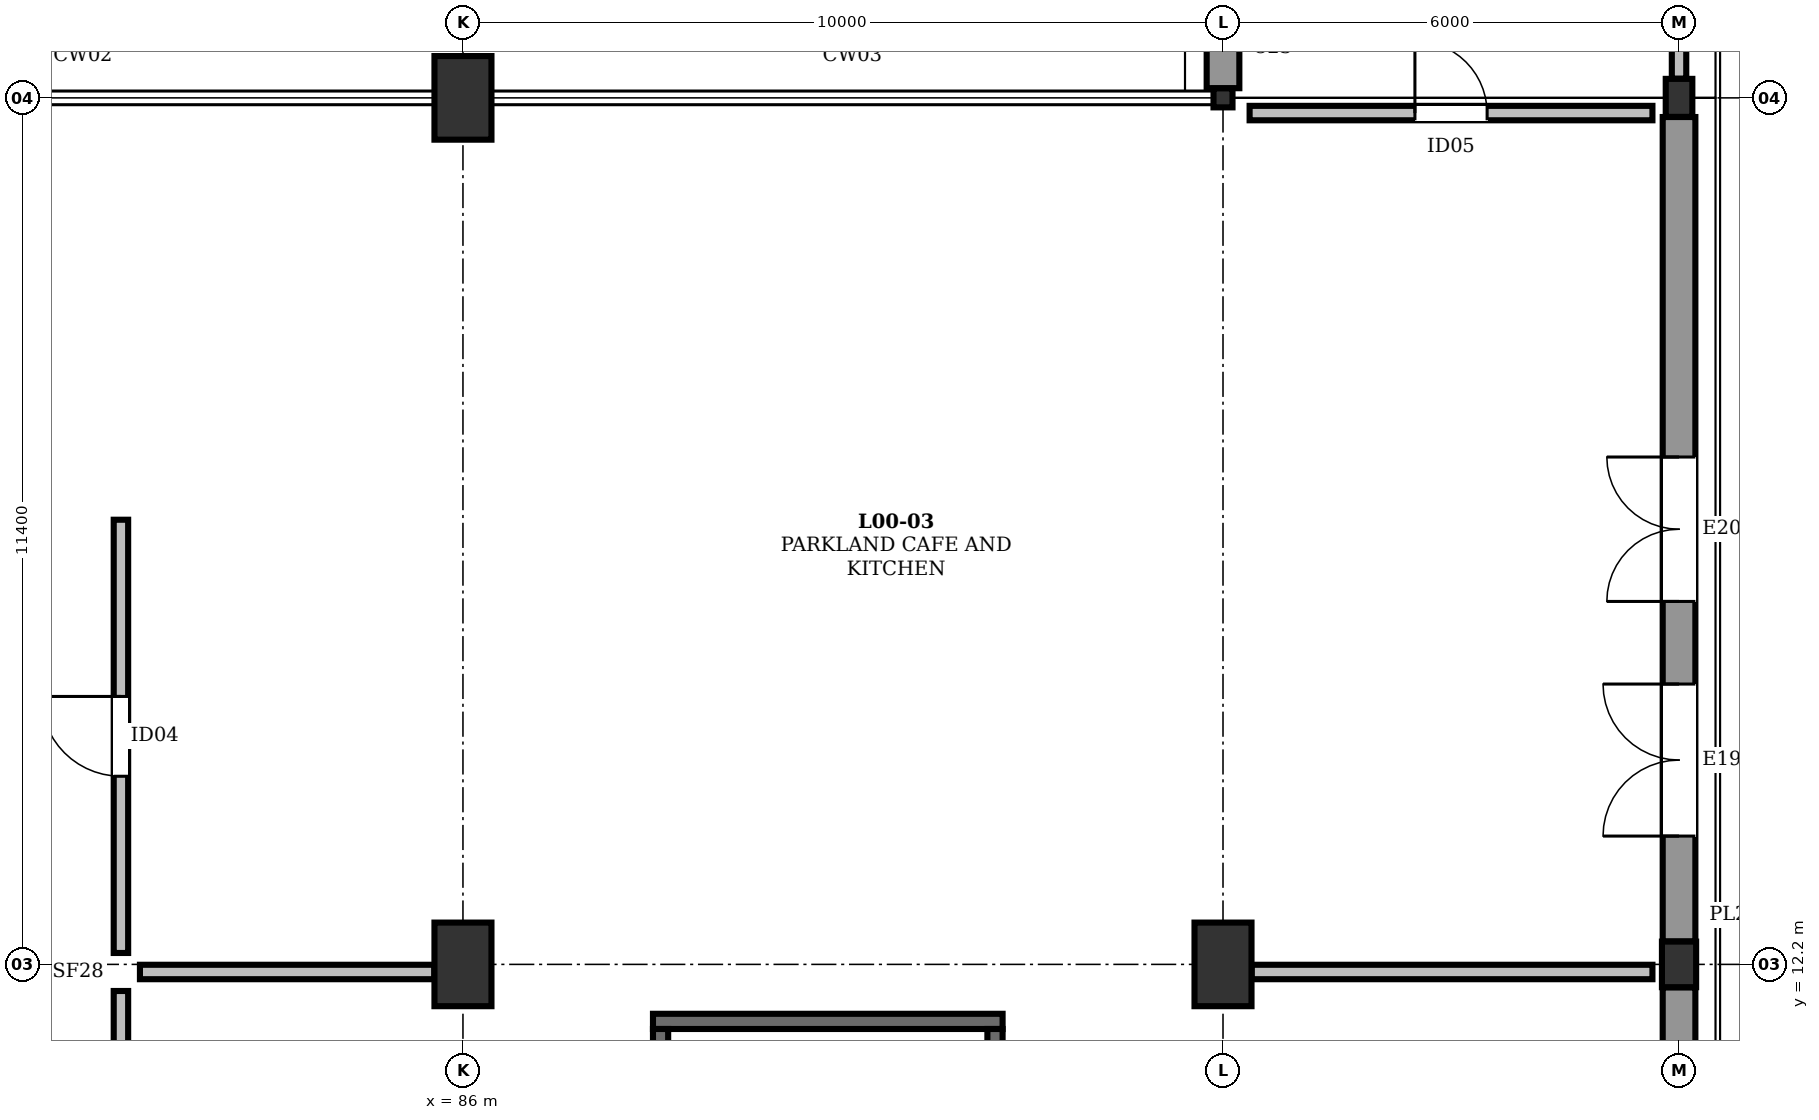
"""IFC4 building model, lengths in metres.
Left out: names, types, materials, properties, quantities, classifications, styles, units other than length and angle.
Written with IfcOpenShell. Run it as: python <this file> out.ifc"""

import sys

from ifc_helpers import new_model, si_unit, direction, frame, frame_2d, origin, origin_2d, place, context, subcontext, project, spatial, rectangle, hollow_rectangle, extrude, element, fill, save


model = new_model("IFC4")
c1 = context("Model", 3, precision=1e-05, world=origin(), true_north=direction((0.0, 1.0)))
c2 = subcontext(c1, "Body", "Model", "MODEL_VIEW")
j1 = project(units=[si_unit("LENGTHUNIT", "METRE"), si_unit("PLANEANGLEUNIT", "RADIAN")], contexts=[c1])
p1 = place(None, origin())
s1 = spatial("IfcSite", under=j1, at=p1, CompositionType="ELEMENT")
p2 = place(p1, origin())
s2 = spatial("IfcBuilding", under=s1, at=p2, CompositionType="ELEMENT")
p3 = place(p2, origin())
s3 = spatial("IfcBuildingStorey", under=s2, at=p3, CompositionType="ELEMENT", Elevation=0.0)
for number, where, z_axis, x_axis in (
    (1, (86.0, 12.2, 0.0), (0.0, 0.0, 1.0), (1.0, 0.0, 0.0)),
    (2, (86.0, 23.6, 0.0), (0.0, 0.0, 1.0), (1.0, 0.0, 0.0)),
    (3, (96.0, 12.2, 0.0), (0.0, 0.0, 1.0), (1.0, 0.0, 0.0)),
):
    element("IfcColumn", number, at=place(p3, frame(where, z_axis=z_axis, x_axis=x_axis)), inside=s3, PredefinedType="COLUMN", context=c2, shape_type="SweptSolid", body=[
        extrude(rectangle(XDim=0.75, YDim=1.1, at=origin_2d()), origin(), (0.0, 0.0, 1.0), 5.4),
    ])
p4 = place(p3, frame((96.0, 23.6, 0.0), z_axis=(0.0, 0.0, 1.0), x_axis=(1.0, 0.0, 0.0)))
e4 = element("IfcColumn", 4, at=p4, inside=s3, PredefinedType="COLUMN", context=c2, shape_type="SweptSolid", body=[
    extrude(hollow_rectangle(XDim=0.25, YDim=0.25, WallThickness=0.012, at=origin_2d()), origin(), (0.0, 0.0, 1.0), 5.4),
])
p5 = place(p3, frame((102.0, 12.2, 0.0), z_axis=(0.0, 0.0, 1.0), x_axis=(1.0, 0.0, 0.0)))
e5 = element("IfcColumn", 5, at=p5, inside=s3, PredefinedType="PILASTER", context=c2, shape_type="SweptSolid", body=[
    extrude(rectangle(XDim=0.45, YDim=0.6, at=origin_2d()), origin(), (0.0, 0.0, 1.0), 5.4),
])
p6 = place(p3, frame((102.0, 23.6, 0.0), z_axis=(0.0, 0.0, 1.0), x_axis=(1.0, 0.0, 0.0)))
e6 = element("IfcColumn", 6, at=p6, inside=s3, PredefinedType="PILASTER", context=c2, shape_type="SweptSolid", body=[
    extrude(rectangle(XDim=0.35, YDim=0.5, at=origin_2d()), origin(), (0.0, 0.0, 1.0), 5.4),
])
p7 = place(p3, frame((96.0, 23.727, 0.0), z_axis=(0.0, 0.0, 1.0), x_axis=(0.0, 1.0, 0.0)))
e7 = element("IfcWall", 7, at=p7, inside=s3, PredefinedType="STANDARD", context=c2, shape_type="SweptSolid", body=[
    extrude(rectangle(XDim=10.721, YDim=0.43, at=frame_2d((5.36, 0.0))), origin(), (0.0, 0.0, 1.0), 4.245),
])
p8 = place(p7, frame((1.359, 0.0, 0.0)))
e8 = element("IfcOpeningElement", 8, at=p8, cuts=e7, PredefinedType="OPENING", context=c2, shape_type="SweptSolid", body=[
    extrude(rectangle(XDim=2.0, YDim=2.35, at=frame_2d((1.0, 1.175))), frame((0.0, 0.227, 0.0), z_axis=(0.0, -1.0, 0.0), x_axis=(1.0, 0.0, 0.0)), (0.0, 0.0, 1.0), 0.454),
])
p9 = place(p7, frame((4.41, 0.0, 0.0)))
e9 = element("IfcOpeningElement", 9, at=p9, cuts=e7, PredefinedType="OPENING", context=c2, shape_type="SweptSolid", body=[
    extrude(rectangle(XDim=1.9, YDim=2.3, at=frame_2d((0.95, 1.15))), frame((0.0, 0.227, 0.0), z_axis=(0.0, -1.0, 0.0), x_axis=(1.0, 0.0, 0.0)), (0.0, 0.0, 1.0), 0.454),
])
p10 = place(p3, frame((102.0, 1.352, 0.0), z_axis=(0.0, 0.0, 1.0), x_axis=(0.0, 1.0, 0.0)))
e10 = element("IfcWall", 10, at=p10, inside=s3, PredefinedType="STANDARD", context=c2, shape_type="SweptSolid", body=[
    extrude(rectangle(XDim=10.546, YDim=0.43, at=frame_2d((5.273, 0.0))), origin(), (0.0, 0.0, 1.0), 4.245),
])
p11 = place(p10, frame((1.17, 0.0, 0.0)))
e11 = element("IfcOpeningElement", 11, at=p11, cuts=e10, PredefinedType="OPENING", context=c2, shape_type="SweptSolid", body=[
    extrude(rectangle(XDim=2.3, YDim=2.4, at=frame_2d((1.15, 1.2))), frame((0.0, 0.227, 0.0), z_axis=(0.0, -1.0, 0.0), x_axis=(1.0, 0.0, 0.0)), (0.0, 0.0, 1.0), 0.454),
])
p12 = place(p10, frame((4.198, 0.0, 0.0)))
e12 = element("IfcOpeningElement", 12, at=p12, cuts=e10, PredefinedType="OPENING", context=c2, shape_type="SweptSolid", body=[
    extrude(rectangle(XDim=2.15, YDim=2.4, at=frame_2d((1.075, 1.2))), frame((0.0, 0.227, 0.0), z_axis=(0.0, -1.0, 0.0), x_axis=(1.0, 0.0, 0.0)), (0.0, 0.0, 1.0), 0.454),
])
p13 = place(p3, frame((102.0, 12.502, 0.0), z_axis=(0.0, 0.0, 1.0), x_axis=(0.0, 1.0, 0.0)))
e13 = element("IfcWall", 13, at=p13, inside=s3, PredefinedType="STANDARD", context=c2, shape_type="SweptSolid", body=[
    extrude(rectangle(XDim=10.846, YDim=0.43, at=frame_2d((5.423, 0.0))), origin(), (0.0, 0.0, 1.0), 4.245),
])
p14 = place(p13, frame((1.386, 0.0, 0.0)))
e14 = element("IfcOpeningElement", 14, at=p14, cuts=e13, PredefinedType="OPENING", context=c2, shape_type="SweptSolid", body=[
    extrude(rectangle(XDim=2.0, YDim=2.35, at=frame_2d((1.0, 1.175))), frame((0.0, 0.227, 0.0), z_axis=(0.0, -1.0, 0.0), x_axis=(1.0, 0.0, 0.0)), (0.0, 0.0, 1.0), 0.454),
])
p15 = place(p13, frame((4.473, 0.0, 0.0)))
e15 = element("IfcOpeningElement", 15, at=p15, cuts=e13, PredefinedType="OPENING", context=c2, shape_type="SweptSolid", body=[
    extrude(rectangle(XDim=1.9, YDim=2.3, at=frame_2d((0.95, 1.15))), frame((0.0, 0.227, 0.0), z_axis=(0.0, -1.0, 0.0), x_axis=(1.0, 0.0, 0.0)), (0.0, 0.0, 1.0), 0.454),
])
p16 = place(p3, frame((88.5, 11.45, 0.0), z_axis=(0.0, 0.0, 1.0), x_axis=(1.0, 0.0, 0.0)))
e16 = element("IfcWall", 16, at=p16, inside=s3, PredefinedType="SOLIDWALL", context=c2, shape_type="SweptSolid", body=[
    extrude(rectangle(XDim=4.6, YDim=0.2, at=frame_2d((2.3, 0.0))), origin(), (0.0, 0.0, 1.0), 5.16),
])
p17 = place(p3, frame((88.6, 2.85, 0.0), z_axis=(0.0, 0.0, 1.0), x_axis=(0.0, 1.0, 0.0)))
e17 = element("IfcWall", 17, at=p17, inside=s3, PredefinedType="SOLIDWALL", context=c2, shape_type="SweptSolid", body=[
    extrude(rectangle(XDim=8.5, YDim=0.2, at=frame_2d((4.25, 0.0))), origin(), (0.0, 0.0, 1.0), 5.16),
])
p18 = place(p17, frame((0.22, 0.0, 0.0)))
e18 = element("IfcOpeningElement", 18, at=p18, cuts=e17, PredefinedType="OPENING", context=c2, shape_type="SweptSolid", body=[
    extrude(rectangle(XDim=1.6, YDim=2.2, at=frame_2d((0.8, 1.1))), frame((0.0, 0.112, 0.0), z_axis=(0.0, -1.0, 0.0), x_axis=(1.0, 0.0, 0.0)), (0.0, 0.0, 1.0), 0.224),
])
p19 = place(p3, frame((93.0, 2.85, 0.0), z_axis=(0.0, 0.0, 1.0), x_axis=(0.0, 1.0, 0.0)))
e19 = element("IfcWall", 19, at=p19, inside=s3, PredefinedType="SOLIDWALL", context=c2, shape_type="SweptSolid", body=[
    extrude(rectangle(XDim=8.5, YDim=0.2, at=frame_2d((4.25, 0.0))), origin(), (0.0, 0.0, 1.0), 5.16),
])
p20 = place(p3, frame((81.5, 1.35, 0.0), z_axis=(0.0, 0.0, 1.0), x_axis=(0.0, 1.0, 0.0)))
e20 = element("IfcWall", 20, at=p20, inside=s3, PredefinedType="SOLIDWALL", context=c2, shape_type="SweptSolid", body=[
    extrude(rectangle(XDim=10.5, YDim=0.19, at=frame_2d((5.25, 0.0))), origin(), (0.0, 0.0, 1.0), 4.245),
])
p21 = place(p20, frame((4.65, 0.0, 0.0)))
e21 = element("IfcOpeningElement", 21, at=p21, cuts=e20, PredefinedType="OPENING", context=c2, shape_type="SweptSolid", body=[
    extrude(rectangle(XDim=1.2, YDim=2.15, at=frame_2d((0.6, 1.075))), frame((0.0, 0.107, 0.0), z_axis=(0.0, -1.0, 0.0), x_axis=(1.0, 0.0, 0.0)), (0.0, 0.0, 1.0), 0.214),
])
p22 = place(p3, frame((81.5, 12.35, 0.0), z_axis=(0.0, 0.0, 1.0), x_axis=(0.0, 1.0, 0.0)))
e22 = element("IfcWall", 22, at=p22, inside=s3, PredefinedType="SOLIDWALL", context=c2, shape_type="SweptSolid", body=[
    extrude(rectangle(XDim=5.7, YDim=0.19, at=frame_2d((2.85, 0.0))), origin(), (0.0, 0.0, 1.0), 4.245),
])
p23 = place(p22, frame((2.325, 0.0, 0.0)))
e23 = element("IfcOpeningElement", 23, at=p23, cuts=e22, PredefinedType="OPENING", context=c2, shape_type="SweptSolid", body=[
    extrude(rectangle(XDim=1.05, YDim=2.15, at=frame_2d((0.525, 1.075))), frame((0.0, 0.107, 0.0), z_axis=(0.0, -1.0, 0.0), x_axis=(1.0, 0.0, 0.0)), (0.0, 0.0, 1.0), 0.214),
])
p24 = place(p3, frame((81.75, 12.1, 0.0), z_axis=(0.0, 0.0, 1.0), x_axis=(1.0, 0.0, 0.0)))
e24 = element("IfcWall", 24, at=p24, inside=s3, PredefinedType="SOLIDWALL", context=c2, shape_type="SweptSolid", body=[
    extrude(rectangle(XDim=3.873, YDim=0.19, at=frame_2d((1.937, 0.0))), origin(), (0.0, 0.0, 1.0), 4.245),
])
p25 = place(p3, frame((96.377, 12.1, 0.0), z_axis=(0.0, 0.0, 1.0), x_axis=(1.0, 0.0, 0.0)))
e25 = element("IfcWall", 25, at=p25, inside=s3, PredefinedType="SOLIDWALL", context=c2, shape_type="SweptSolid", body=[
    extrude(rectangle(XDim=5.273, YDim=0.19, at=frame_2d((2.636, 0.0))), origin(), (0.0, 0.0, 1.0), 4.245),
])
p26 = place(p3, frame((96.35, 23.4, 0.0), z_axis=(0.0, 0.0, 1.0), x_axis=(1.0, 0.0, 0.0)))
e26 = element("IfcWall", 26, at=p26, inside=s3, PredefinedType="SOLIDWALL", context=c2, shape_type="SweptSolid", body=[
    extrude(rectangle(XDim=5.3, YDim=0.19, at=frame_2d((2.65, 0.0))), origin(), (0.0, 0.0, 1.0), 4.245),
])
p27 = place(p26, frame((2.175, 0.0, 0.0)))
e27 = element("IfcOpeningElement", 27, at=p27, cuts=e26, PredefinedType="OPENING", context=c2, shape_type="SweptSolid", body=[
    extrude(rectangle(XDim=0.95, YDim=2.15, at=frame_2d((0.475, 1.075))), frame((0.0, 0.107, 0.0), z_axis=(0.0, -1.0, 0.0), x_axis=(1.0, 0.0, 0.0)), (0.0, 0.0, 1.0), 0.214),
])
p28 = place(p3, frame((102.0, 23.852, 0.0), z_axis=(0.0, 0.0, 1.0), x_axis=(0.0, 1.0, 0.0)))
e28 = element("IfcWall", 28, at=p28, inside=s3, PredefinedType="SOLIDWALL", context=c2, shape_type="SweptSolid", body=[
    extrude(rectangle(XDim=10.846, YDim=0.19, at=frame_2d((5.423, 0.0))), origin(), (0.0, 0.0, 1.0), 4.245),
])
p29 = place(p28, frame((4.873, 0.0, 0.0)))
e29 = element("IfcOpeningElement", 29, at=p29, cuts=e28, PredefinedType="OPENING", context=c2, shape_type="SweptSolid", body=[
    extrude(rectangle(XDim=1.1, YDim=2.2, at=frame_2d((0.55, 1.1))), frame((0.0, 0.107, 0.0), z_axis=(0.0, -1.0, 0.0), x_axis=(1.0, 0.0, 0.0)), (0.0, 0.0, 1.0), 0.214),
])
p30 = place(p14, origin())
e30 = element("IfcDoor", 30, at=p30, inside=s3, OperationType="DOUBLE_DOOR_SINGLE_SWING", PredefinedType="DOOR", context=c2, shape_type="SweptSolid", body=[
    extrude(rectangle(XDim=2.0, YDim=2.35, at=frame_2d((1.0, 1.175))), frame((0.0, 0.025, 0.0), z_axis=(0.0, -1.0, 0.0), x_axis=(1.0, 0.0, 0.0)), (0.0, 0.0, 1.0), 0.05),
])
fill(e14, e30)
p31 = place(p15, origin())
e31 = element("IfcDoor", 31, at=p31, inside=s3, OperationType="DOUBLE_DOOR_SINGLE_SWING", PredefinedType="DOOR", context=c2, shape_type="SweptSolid", body=[
    extrude(rectangle(XDim=1.9, YDim=2.3, at=frame_2d((0.95, 1.15))), frame((0.0, 0.025, 0.0), z_axis=(0.0, -1.0, 0.0), x_axis=(1.0, 0.0, 0.0)), (0.0, 0.0, 1.0), 0.05),
])
fill(e15, e31)
p32 = place(p23, origin())
e32 = element("IfcDoor", 32, at=p32, inside=s3, OperationType="SINGLE_SWING_RIGHT", PredefinedType="DOOR", context=c2, shape_type="SweptSolid", body=[
    extrude(rectangle(XDim=1.05, YDim=2.15, at=frame_2d((0.525, 1.075))), frame((0.0, 0.025, 0.0), z_axis=(0.0, -1.0, 0.0), x_axis=(1.0, 0.0, 0.0)), (0.0, 0.0, 1.0), 0.05),
])
fill(e23, e32)
p33 = place(p27, origin())
e33 = element("IfcDoor", 33, at=p33, inside=s3, OperationType="SINGLE_SWING_LEFT", PredefinedType="DOOR", context=c2, shape_type="SweptSolid", body=[
    extrude(rectangle(XDim=0.95, YDim=2.15, at=frame_2d((0.475, 1.075))), frame((0.0, 0.025, 0.0), z_axis=(0.0, -1.0, 0.0), x_axis=(1.0, 0.0, 0.0)), (0.0, 0.0, 1.0), 0.05),
])
fill(e27, e33)
save(model, sys.argv[1])
